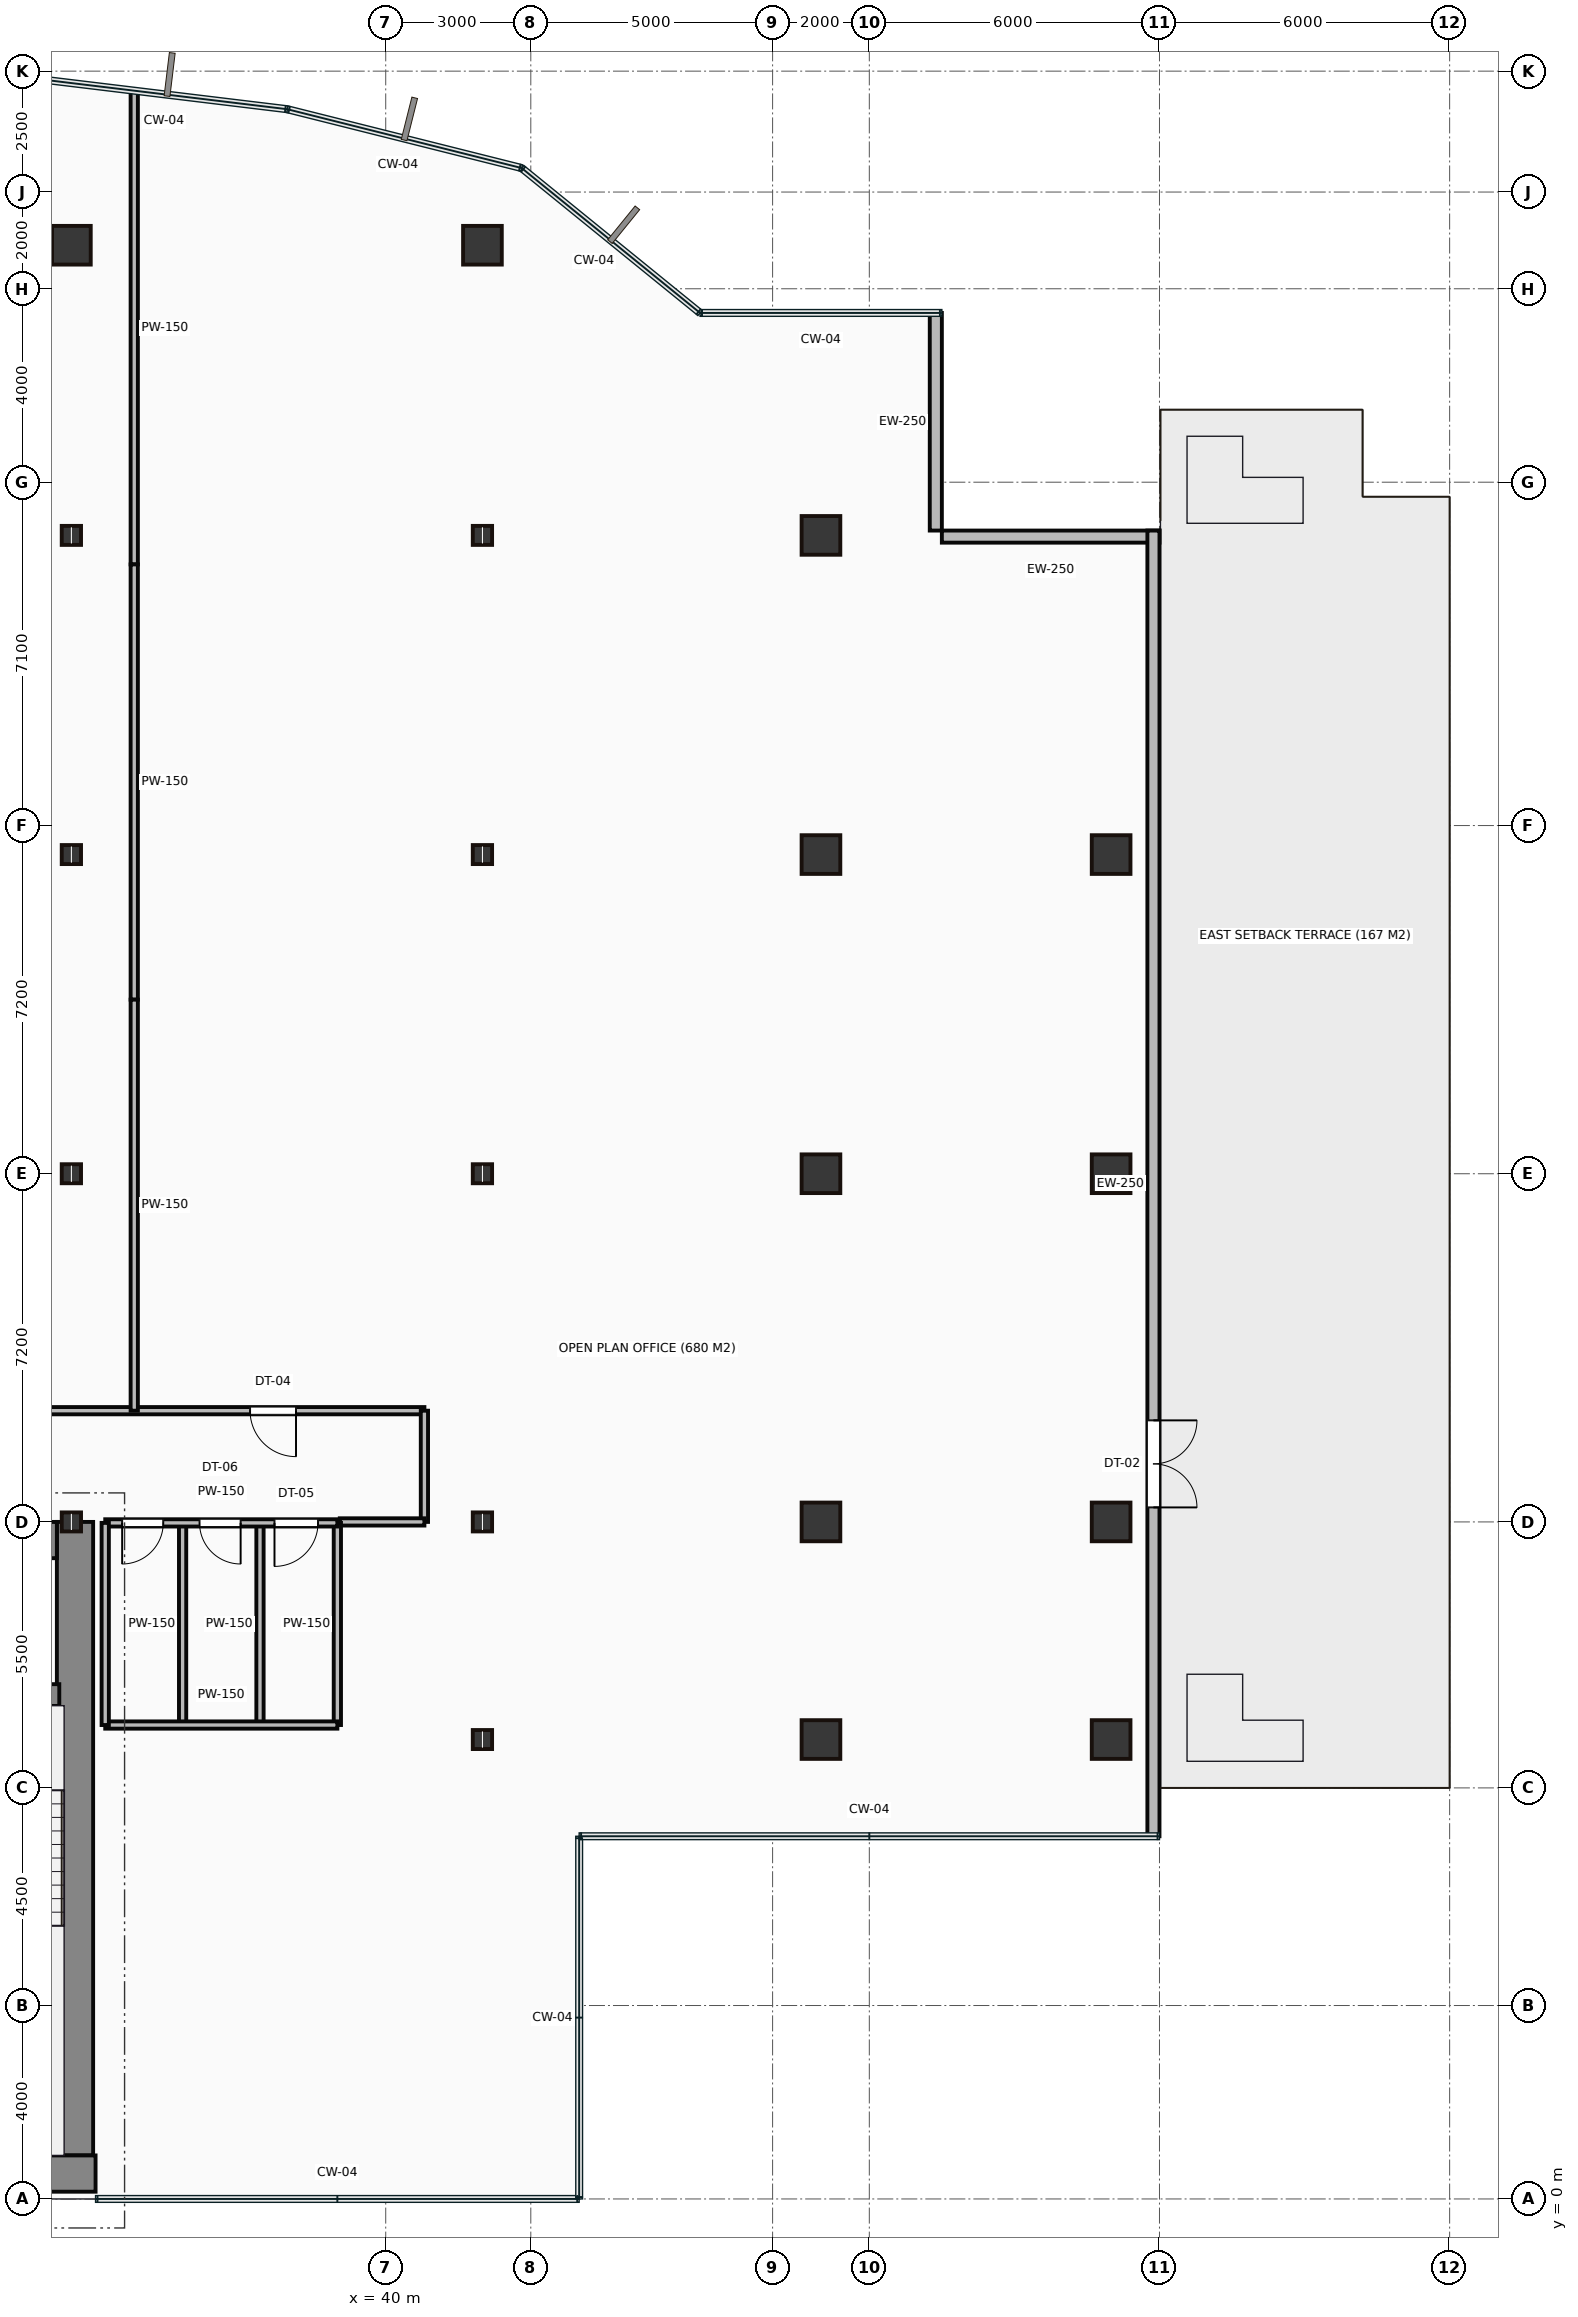
"""IFC4 building model, lengths in metres.
Left out: names, types, materials, properties, quantities, classifications, styles, units other than length and angle.
Written with IfcOpenShell. Run it as: python <this file> out.ifc"""

import sys

from ifc_helpers import new_model, si_unit, direction, frame, frame_2d, origin, origin_2d, place, context, subcontext, project, spatial, rectangle, hollow_rectangle, i_section, extrude, source, transform, mapped, element, fill, save


model = new_model("IFC4")
c1 = context("Model", 3, precision=1e-05, world=origin(), true_north=direction((0.0, 1.0)))
c2 = subcontext(c1, "Body", "Model", "MODEL_VIEW")
j1 = project(units=[si_unit("LENGTHUNIT", "METRE"), si_unit("PLANEANGLEUNIT", "RADIAN")], contexts=[c1])
p1 = place(None, origin())
s1 = spatial("IfcSite", under=j1, at=p1, CompositionType="ELEMENT")
p2 = place(p1, origin())
s2 = spatial("IfcBuilding", under=s1, at=p2, CompositionType="ELEMENT")
p3 = place(p2, frame((0.0, 0.0, 88.65)))
s3 = spatial("IfcBuildingStorey", under=s2, at=p3, CompositionType="ELEMENT", Elevation=88.65)
m1 = source(origin(), c2, "Body", "SweptSolid", [
    extrude(rectangle(XDim=29.5, YDim=0.75, at=frame_2d((14.75, 0.0))), origin(), (0.0, 0.0, 1.0), 3.65),
])
p4 = place(p3, frame((4.5, 0.525, 0.0), z_axis=(0.0, 0.0, 1.0), x_axis=(1.0, 0.0, 0.0)))
e1 = element("IfcWall", 1, at=p4, inside=s3, PredefinedType="SHEAR", context=c2, shape_type="MappedRepresentation", body=[
    mapped(m1, transform((0.0, 0.0, 0.0))),
])
m2 = source(origin(), c2, "Body", "SweptSolid", [
    extrude(rectangle(XDim=13.1, YDim=0.75, at=frame_2d((6.55, 0.0))), origin(), (0.0, 0.0, 1.0), 3.65),
])
p5 = place(p3, frame((33.575, 0.9, 0.0), z_axis=(0.0, 0.0, 1.0), x_axis=(0.0, 1.0, 0.0)))
e2 = element("IfcWall", 2, at=p5, inside=s3, PredefinedType="SHEAR", context=c2, shape_type="MappedRepresentation", body=[
    mapped(m2, transform((0.0, 0.0, 0.0))),
])
m3 = source(origin(), c2, "Body", "SweptSolid", [
    extrude(rectangle(XDim=12.6, YDim=0.75, at=frame_2d((6.3, 0.0))), origin(), (0.0, 0.0, 1.0), 3.65),
])
p6 = place(p3, frame((20.6, 13.625, 0.0), z_axis=(0.0, 0.0, 1.0), x_axis=(1.0, 0.0, 0.0)))
e3 = element("IfcWall", 3, at=p6, inside=s3, PredefinedType="SHEAR", context=c2, shape_type="MappedRepresentation", body=[
    mapped(m3, transform((0.0, 0.0, 0.0))),
])
p7 = place(p6, frame((9.25, 0.0, 0.0)))
e4 = element("IfcOpeningElement", 4, at=p7, cuts=e3, PredefinedType="OPENING", context=c2, shape_type="SweptSolid", body=[
    extrude(rectangle(XDim=1.1, YDim=2.15, at=frame_2d((0.55, 1.075))), frame((0.0, 0.385, 0.0), z_axis=(0.0, -1.0, 0.0), x_axis=(1.0, 0.0, 0.0)), (0.0, 0.0, 1.0), 0.77),
])
m4 = source(origin(), c2, "Body", "SweptSolid", [
    extrude(rectangle(XDim=3.39, YDim=0.45, at=frame_2d((1.695, 0.0))), origin(), (0.0, 0.0, 1.0), 3.65),
])
p8 = place(p3, frame((29.86, 10.42, 0.0), z_axis=(0.0, 0.0, 1.0), x_axis=(1.0, 0.0, 0.0)))
e5 = element("IfcWall", 5, at=p8, inside=s3, PredefinedType="SHEAR", context=c2, shape_type="MappedRepresentation", body=[
    mapped(m4, transform((0.0, 0.0, 0.0))),
])
p9 = place(p8, frame((1.1, 0.0, 0.0)))
e6 = element("IfcOpeningElement", 6, at=p9, cuts=e5, PredefinedType="OPENING", context=c2, shape_type="SweptSolid", body=[
    extrude(rectangle(XDim=1.1, YDim=2.15, at=frame_2d((0.55, 1.075))), frame((0.0, 0.235, 0.0), z_axis=(0.0, -1.0, 0.0), x_axis=(1.0, 0.0, 0.0)), (0.0, 0.0, 1.0), 0.47),
])
m5 = source(origin(), c2, "Body", "SweptSolid", [
    extrude(i_section(OverallWidth=0.399, OverallDepth=0.393, WebThickness=0.023, FlangeThickness=0.037, at=origin_2d()), origin(), (0.0, 0.0, 1.0), 3.65),
])
for number, where, z_axis, x_axis in (
    (7, (33.5, 14.0, 0.0), (0.0, 0.0, 1.0), (1.0, 0.0, 0.0)),
    (8, (33.5, 21.2, 0.0), (0.0, 0.0, 1.0), (1.0, 0.0, 0.0)),
    (9, (33.5, 27.8, 0.0), (0.0, 0.0, 1.0), (1.0, 0.0, 0.0)),
    (10, (33.5, 34.4, 0.0), (0.0, 0.0, 1.0), (1.0, 0.0, 0.0)),
):
    element("IfcColumn", number, at=place(p3, frame(where, z_axis=z_axis, x_axis=x_axis)), inside=s3, PredefinedType="COLUMN", context=c2, shape_type="MappedRepresentation", body=[
        mapped(m5, transform((0.0, 0.0, 0.0))),
    ])
m6 = source(origin(), c2, "Body", "SweptSolid", [
    extrude(hollow_rectangle(XDim=0.8, YDim=0.8, WallThickness=0.04, at=origin_2d()), origin(), (0.0, 0.0, 1.0), 3.65),
])
p10 = place(p3, frame((33.5, 40.4, 0.0), z_axis=(0.0, 0.0, 1.0), x_axis=(1.0, 0.0, 0.0)))
e11 = element("IfcColumn", 11, at=p10, inside=s3, PredefinedType="COLUMN", context=c2, shape_type="MappedRepresentation", body=[
    mapped(m6, transform((0.0, 0.0, 0.0))),
])
for number, where, z_axis, x_axis in (
    (12, (42.0, 9.5, 0.0), (0.0, 0.0, 1.0), (1.0, 0.0, 0.0)),
    (13, (42.0, 14.0, 0.0), (0.0, 0.0, 1.0), (1.0, 0.0, 0.0)),
    (14, (42.0, 21.2, 0.0), (0.0, 0.0, 1.0), (1.0, 0.0, 0.0)),
    (15, (42.0, 27.8, 0.0), (0.0, 0.0, 1.0), (1.0, 0.0, 0.0)),
    (16, (42.0, 34.4, 0.0), (0.0, 0.0, 1.0), (1.0, 0.0, 0.0)),
):
    element("IfcColumn", number, at=place(p3, frame(where, z_axis=z_axis, x_axis=x_axis)), inside=s3, PredefinedType="COLUMN", context=c2, shape_type="MappedRepresentation", body=[
        mapped(m5, transform((0.0, 0.0, 0.0))),
    ])
for number, where, z_axis, x_axis in (
    (17, (42.0, 40.4, 0.0), (0.0, 0.0, 1.0), (1.0, 0.0, 0.0)),
    (18, (49.0, 9.5, 0.0), (0.0, 0.0, 1.0), (1.0, 0.0, 0.0)),
    (19, (49.0, 14.0, 0.0), (0.0, 0.0, 1.0), (1.0, 0.0, 0.0)),
    (20, (49.0, 21.2, 0.0), (0.0, 0.0, 1.0), (1.0, 0.0, 0.0)),
    (21, (49.0, 27.8, 0.0), (0.0, 0.0, 1.0), (1.0, 0.0, 0.0)),
    (22, (49.0, 34.4, 0.0), (0.0, 0.0, 1.0), (1.0, 0.0, 0.0)),
    (23, (55.0, 9.5, 0.0), (0.0, 0.0, 1.0), (1.0, 0.0, 0.0)),
    (24, (55.0, 14.0, 0.0), (0.0, 0.0, 1.0), (1.0, 0.0, 0.0)),
    (25, (55.0, 21.2, 0.0), (0.0, 0.0, 1.0), (1.0, 0.0, 0.0)),
    (26, (55.0, 27.8, 0.0), (0.0, 0.0, 1.0), (1.0, 0.0, 0.0)),
):
    element("IfcColumn", number, at=place(p3, frame(where, z_axis=z_axis, x_axis=x_axis)), inside=s3, PredefinedType="COLUMN", context=c2, shape_type="MappedRepresentation", body=[
        mapped(m6, transform((0.0, 0.0, 0.0))),
    ])
m7 = source(origin(), c2, "Body", "SweptSolid", [
    extrude(rectangle(XDim=27.0, YDim=0.25, at=frame_2d((13.5, 0.0))), origin(), (0.0, 0.0, 1.0), 3.4),
])
p11 = place(p3, frame((55.875, 7.5, 0.0), z_axis=(0.0, 0.0, 1.0), x_axis=(0.0, 1.0, 0.0)))
e27 = element("IfcWall", 27, at=p11, inside=s3, PredefinedType="STANDARD", context=c2, shape_type="MappedRepresentation", body=[
    mapped(m7, transform((0.0, 0.0, 0.0))),
])
p12 = place(p11, frame((6.8, 0.0, 0.0)))
e28 = element("IfcOpeningElement", 28, at=p12, cuts=e27, PredefinedType="OPENING", context=c2, shape_type="SweptSolid", body=[
    extrude(rectangle(XDim=1.8, YDim=2.2, at=frame_2d((0.9, 1.1))), frame((0.0, 0.135, 0.0), z_axis=(0.0, -1.0, 0.0), x_axis=(1.0, 0.0, 0.0)), (0.0, 0.0, 1.0), 0.27),
])
m8 = source(origin(), c2, "Body", "SweptSolid", [
    extrude(rectangle(XDim=4.5, YDim=0.25, at=frame_2d((2.25, 0.0))), origin(), (0.0, 0.0, 1.0), 3.4),
])
for number, where, z_axis, x_axis in (
    (29, (56.0, 34.375, 0.0), (0.0, 0.0, 1.0), (-1.0, 0.0, 0.0)),
    (30, (51.375, 34.5, 0.0), (0.0, 0.0, 1.0), (0.0, 1.0, 0.0)),
):
    element("IfcWall", number, at=place(p3, frame(where, z_axis=z_axis, x_axis=x_axis)), inside=s3, PredefinedType="STANDARD", context=c2, shape_type="MappedRepresentation", body=[
        mapped(m8, transform((0.0, 0.0, 0.0))),
    ])
m9 = source(origin(), c2, "Body", "SweptSolid", [
    extrude(rectangle(XDim=4.8, YDim=0.15, at=frame_2d((2.4, 0.0))), origin(), (0.0, 0.0, 1.0), 2.702),
])
p13 = place(p3, frame((34.2, 13.98, 0.0), z_axis=(0.0, 0.0, 1.0), x_axis=(1.0, 0.0, 0.0)))
e31 = element("IfcWall", 31, at=p13, inside=s3, PredefinedType="PARTITIONING", context=c2, shape_type="MappedRepresentation", body=[
    mapped(m9, transform((0.0, 0.0, 0.0))),
])
p14 = place(p13, frame((0.35, 0.0, 0.0)))
e32 = element("IfcOpeningElement", 32, at=p14, cuts=e31, PredefinedType="OPENING", context=c2, shape_type="SweptSolid", body=[
    extrude(rectangle(XDim=0.85, YDim=2.1, at=frame_2d((0.425, 1.05))), frame((0.0, 0.085, 0.0), z_axis=(0.0, -1.0, 0.0), x_axis=(1.0, 0.0, 0.0)), (0.0, 0.0, 1.0), 0.17),
])
p15 = place(p13, frame((1.95, 0.0, 0.0)))
e33 = element("IfcOpeningElement", 33, at=p15, cuts=e31, PredefinedType="OPENING", context=c2, shape_type="SweptSolid", body=[
    extrude(rectangle(XDim=0.85, YDim=2.1, at=frame_2d((0.425, 1.05))), frame((0.0, 0.085, 0.0), z_axis=(0.0, -1.0, 0.0), x_axis=(1.0, 0.0, 0.0)), (0.0, 0.0, 1.0), 0.17),
])
p16 = place(p13, frame((3.5, 0.0, 0.0)))
e34 = element("IfcOpeningElement", 34, at=p16, cuts=e31, PredefinedType="OPENING", context=c2, shape_type="SweptSolid", body=[
    extrude(rectangle(XDim=0.9, YDim=2.1, at=frame_2d((0.45, 1.05))), frame((0.0, 0.085, 0.0), z_axis=(0.0, -1.0, 0.0), x_axis=(1.0, 0.0, 0.0)), (0.0, 0.0, 1.0), 0.17),
])
m10 = source(origin(), c2, "Body", "SweptSolid", [
    extrude(rectangle(XDim=4.8, YDim=0.15, at=frame_2d((2.4, 0.0))), origin(), (0.0, 0.0, 1.0), 3.4),
])
p17 = place(p3, frame((34.2, 9.8, 0.0), z_axis=(0.0, 0.0, 1.0), x_axis=(1.0, 0.0, 0.0)))
e35 = element("IfcWall", 35, at=p17, inside=s3, PredefinedType="PARTITIONING", context=c2, shape_type="MappedRepresentation", body=[
    mapped(m10, transform((0.0, 0.0, 0.0))),
])
m11 = source(origin(), c2, "Body", "SweptSolid", [
    extrude(rectangle(XDim=4.18, YDim=0.15, at=frame_2d((2.09, 0.0))), origin(), (0.0, 0.0, 1.0), 3.4),
])
for number, where, z_axis, x_axis in (
    (36, (39.0, 9.8, 0.0), (0.0, 0.0, 1.0), (0.0, 1.0, 0.0)),
    (37, (34.2, 9.8, 0.0), (0.0, 0.0, 1.0), (0.0, 1.0, 0.0)),
    (38, (35.8, 9.8, 0.0), (0.0, 0.0, 1.0), (0.0, 1.0, 0.0)),
    (39, (37.4, 9.8, 0.0), (0.0, 0.0, 1.0), (0.0, 1.0, 0.0)),
):
    element("IfcWall", number, at=place(p3, frame(where, z_axis=z_axis, x_axis=x_axis)), inside=s3, PredefinedType="PARTITIONING", context=c2, shape_type="MappedRepresentation", body=[
        mapped(m11, transform((0.0, 0.0, 0.0))),
    ])
m12 = source(origin(), c2, "Body", "SweptSolid", [
    extrude(rectangle(XDim=28.75, YDim=0.15, at=frame_2d((14.375, 0.0))), origin(), (0.0, 0.0, 1.0), 3.4),
])
p18 = place(p3, frame((12.05, 16.3, 0.0), z_axis=(0.0, 0.0, 1.0), x_axis=(1.0, 0.0, 0.0)))
e40 = element("IfcWall", 40, at=p18, inside=s3, PredefinedType="PARTITIONING", context=c2, shape_type="MappedRepresentation", body=[
    mapped(m12, transform((0.0, 0.0, 0.0))),
])
p19 = place(p18, frame((5.43, 0.0, 0.0)))
e41 = element("IfcOpeningElement", 41, at=p19, cuts=e40, PredefinedType="OPENING", context=c2, shape_type="SweptSolid", body=[
    extrude(rectangle(XDim=0.95, YDim=2.15, at=frame_2d((0.475, 1.075))), frame((0.0, 0.085, 0.0), z_axis=(0.0, -1.0, 0.0), x_axis=(1.0, 0.0, 0.0)), (0.0, 0.0, 1.0), 0.17),
])
p20 = place(p18, frame((16.675, 0.0, 0.0)))
e42 = element("IfcOpeningElement", 42, at=p20, cuts=e40, PredefinedType="OPENING", context=c2, shape_type="SweptSolid", body=[
    extrude(rectangle(XDim=0.95, YDim=2.15, at=frame_2d((0.475, 1.075))), frame((0.0, 0.085, 0.0), z_axis=(0.0, -1.0, 0.0), x_axis=(1.0, 0.0, 0.0)), (0.0, 0.0, 1.0), 0.17),
])
p21 = place(p18, frame((25.145, 0.0, 0.0)))
e43 = element("IfcOpeningElement", 43, at=p21, cuts=e40, PredefinedType="OPENING", context=c2, shape_type="SweptSolid", body=[
    extrude(rectangle(XDim=0.95, YDim=2.15, at=frame_2d((0.475, 1.075))), frame((0.0, 0.085, 0.0), z_axis=(0.0, -1.0, 0.0), x_axis=(1.0, 0.0, 0.0)), (0.0, 0.0, 1.0), 0.17),
])
m13 = source(origin(), c2, "Body", "SweptSolid", [
    extrude(rectangle(XDim=2.3, YDim=0.15, at=frame_2d((1.15, 0.0))), origin(), (0.0, 0.0, 1.0), 3.4),
])
p22 = place(p3, frame((40.8, 16.3, 0.0), z_axis=(0.0, 0.0, 1.0), x_axis=(0.0, -1.0, 0.0)))
e44 = element("IfcWall", 44, at=p22, inside=s3, PredefinedType="PARTITIONING", context=c2, shape_type="MappedRepresentation", body=[
    mapped(m13, transform((0.0, 0.0, 0.0))),
])
m14 = source(origin(), c2, "Body", "SweptSolid", [
    extrude(rectangle(XDim=1.75, YDim=0.15, at=frame_2d((0.875, 0.0))), origin(), (0.0, 0.0, 1.0), 2.702),
])
p23 = place(p3, frame((40.8, 14.0, 0.0), z_axis=(0.0, 0.0, 1.0), x_axis=(-1.0, 0.0, 0.0)))
e45 = element("IfcWall", 45, at=p23, inside=s3, PredefinedType="PARTITIONING", context=c2, shape_type="MappedRepresentation", body=[
    mapped(m14, transform((0.0, 0.0, 0.0))),
])
m15 = source(origin(), c2, "Body", "SweptSolid", [
    extrude(rectangle(XDim=9.776, YDim=0.15, at=frame_2d((4.888, 0.0))), origin(), (0.0, 0.0, 1.0), 3.4),
])
p24 = place(p3, frame((34.8, 43.576, 0.0), z_axis=(0.0, 0.0, 1.0), x_axis=(0.0, -1.0, 0.0)))
e46 = element("IfcWall", 46, at=p24, inside=s3, PredefinedType="PARTITIONING", context=c2, shape_type="MappedRepresentation", body=[
    mapped(m15, transform((0.0, 0.0, 0.0))),
])
m16 = source(origin(), c2, "Body", "SweptSolid", [
    extrude(rectangle(XDim=9.0, YDim=0.15, at=frame_2d((4.5, 0.0))), origin(), (0.0, 0.0, 1.0), 3.4),
])
p25 = place(p3, frame((34.8, 33.8, 0.0), z_axis=(0.0, 0.0, 1.0), x_axis=(0.0, -1.0, 0.0)))
e47 = element("IfcWall", 47, at=p25, inside=s3, PredefinedType="PARTITIONING", context=c2, shape_type="MappedRepresentation", body=[
    mapped(m16, transform((0.0, 0.0, 0.0))),
])
m17 = source(origin(), c2, "Body", "SweptSolid", [
    extrude(rectangle(XDim=8.5, YDim=0.15, at=frame_2d((4.25, 0.0))), origin(), (0.0, 0.0, 1.0), 3.4),
])
p26 = place(p3, frame((34.8, 24.8, 0.0), z_axis=(0.0, 0.0, 1.0), x_axis=(0.0, -1.0, 0.0)))
e48 = element("IfcWall", 48, at=p26, inside=s3, PredefinedType="PARTITIONING", context=c2, shape_type="MappedRepresentation", body=[
    mapped(m17, transform((0.0, 0.0, 0.0))),
])
m18 = source(origin(), c2, "Body", "SweptSolid", [
    extrude(rectangle(XDim=1.8, YDim=2.2, at=frame_2d((0.9, 1.1))), frame((0.0, 0.025, 0.0), z_axis=(0.0, -1.0, 0.0), x_axis=(1.0, 0.0, 0.0)), (0.0, 0.0, 1.0), 0.05),
])
p27 = place(p12, frame((1.8, 0.0, 0.0), z_axis=(0.0, 0.0, 1.0), x_axis=(-1.0, 0.0, 0.0)))
e49 = element("IfcDoor", 49, at=p27, inside=s3, OperationType="DOUBLE_DOOR_SINGLE_SWING", PredefinedType="DOOR", context=c2, shape_type="MappedRepresentation", body=[
    mapped(m18, transform((0.0, 0.0, 0.0))),
])
fill(e28, e49)
m19 = source(origin(), c2, "Body", "SweptSolid", [
    extrude(rectangle(XDim=0.85, YDim=2.1, at=frame_2d((0.425, 1.05))), frame((0.0, 0.025, 0.0), z_axis=(0.0, -1.0, 0.0), x_axis=(1.0, 0.0, 0.0)), (0.0, 0.0, 1.0), 0.05),
])
p28 = place(p14, frame((0.85, 0.0, 0.0), z_axis=(0.0, 0.0, 1.0), x_axis=(-1.0, 0.0, 0.0)))
e50 = element("IfcDoor", 50, at=p28, inside=s3, OperationType="SINGLE_SWING_LEFT", PredefinedType="DOOR", context=c2, shape_type="MappedRepresentation", body=[
    mapped(m19, transform((0.0, 0.0, 0.0))),
])
fill(e32, e50)
p29 = place(p15, frame((0.85, 0.0, 0.0), z_axis=(0.0, 0.0, 1.0), x_axis=(-1.0, 0.0, 0.0)))
e51 = element("IfcDoor", 51, at=p29, inside=s3, OperationType="SINGLE_SWING_RIGHT", PredefinedType="DOOR", context=c2, shape_type="MappedRepresentation", body=[
    mapped(m19, transform((0.0, 0.0, 0.0))),
])
fill(e33, e51)
m20 = source(origin(), c2, "Body", "SweptSolid", [
    extrude(rectangle(XDim=0.9, YDim=2.1, at=frame_2d((0.45, 1.05))), frame((0.0, 0.025, 0.0), z_axis=(0.0, -1.0, 0.0), x_axis=(1.0, 0.0, 0.0)), (0.0, 0.0, 1.0), 0.05),
])
p30 = place(p16, frame((0.9, 0.0, 0.0), z_axis=(0.0, 0.0, 1.0), x_axis=(-1.0, 0.0, 0.0)))
e52 = element("IfcDoor", 52, at=p30, inside=s3, OperationType="SINGLE_SWING_LEFT", PredefinedType="DOOR", context=c2, shape_type="MappedRepresentation", body=[
    mapped(m20, transform((0.0, 0.0, 0.0))),
])
fill(e34, e52)
m21 = source(origin(), c2, "Body", "SweptSolid", [
    extrude(rectangle(XDim=0.95, YDim=2.15, at=frame_2d((0.475, 1.075))), frame((0.0, 0.025, 0.0), z_axis=(0.0, -1.0, 0.0), x_axis=(1.0, 0.0, 0.0)), (0.0, 0.0, 1.0), 0.05),
])
p31 = place(p21, origin())
e53 = element("IfcDoor", 53, at=p31, inside=s3, OperationType="SINGLE_SWING_RIGHT", PredefinedType="DOOR", context=c2, shape_type="MappedRepresentation", body=[
    mapped(m21, transform((0.0, 0.0, 0.0))),
])
fill(e43, e53)
save(model, sys.argv[1])
